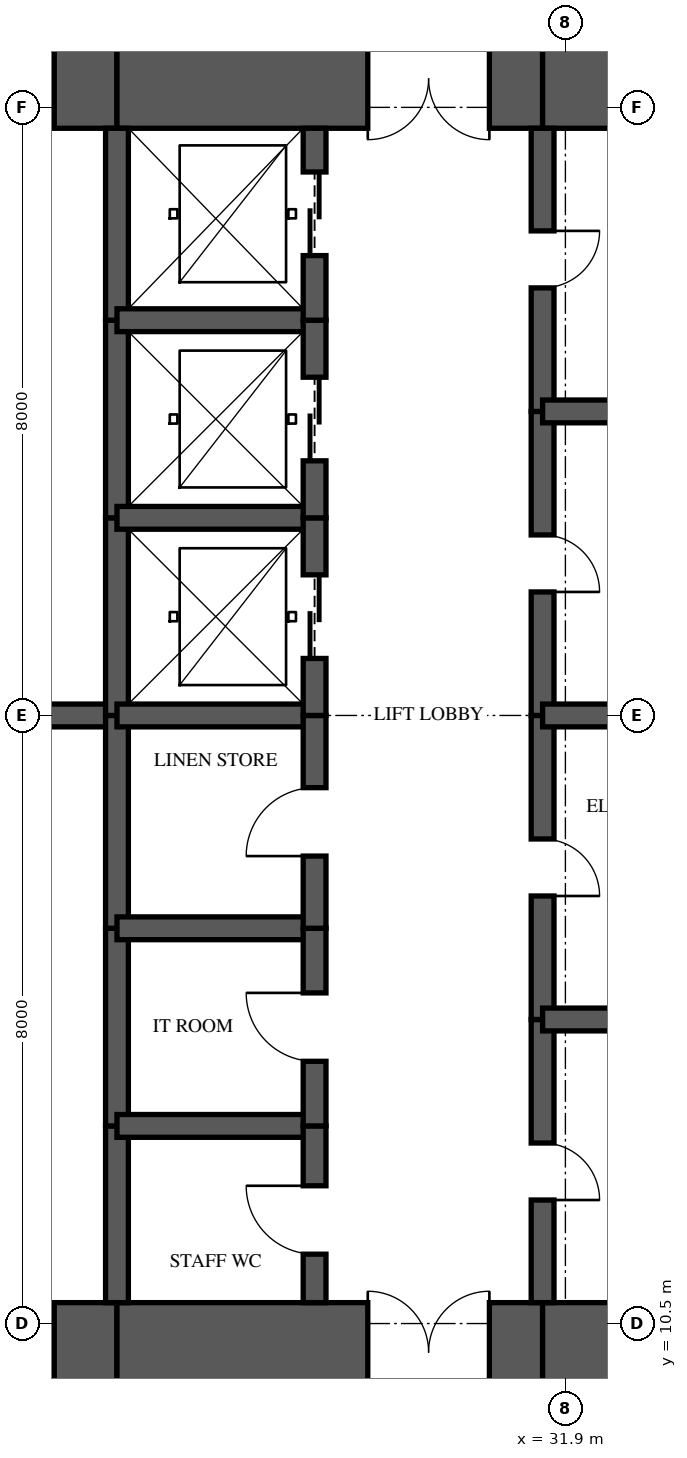
"""IFC4 building model, lengths in metres.
Left out: names, types, materials, properties, quantities, classifications, styles, units other than length and angle.
Written with IfcOpenShell. Run it as: python <this file> out.ifc"""

import sys

from ifc_helpers import new_model, si_unit, direction, frame, frame_2d, origin, place, context, subcontext, project, spatial, rectangle, extrude, element, fill, save


model = new_model("IFC4")
c1 = context("Model", 3, precision=1e-05, world=origin(), true_north=direction((0.0, 1.0)))
c2 = subcontext(c1, "Body", "Model", "MODEL_VIEW")
j1 = project(units=[si_unit("LENGTHUNIT", "METRE"), si_unit("PLANEANGLEUNIT", "RADIAN")], contexts=[c1])
p1 = place(None, origin())
s1 = spatial("IfcSite", under=j1, at=p1, CompositionType="ELEMENT")
p2 = place(p1, origin())
s2 = spatial("IfcBuilding", under=s1, at=p2, CompositionType="ELEMENT")
p3 = place(p2, frame((0.0, 0.0, 171.1)))
s3 = spatial("IfcBuildingStorey", under=s2, at=p3, CompositionType="ELEMENT", Elevation=171.1)
p4 = place(p3, frame((19.65, 10.125, 0.0), z_axis=(0.0, 0.0, 1.0), x_axis=(1.0, 0.0, 0.0)))
e1 = element("IfcWall", 1, at=p4, inside=s3, PredefinedType="SHEAR", context=c2, shape_type="SweptSolid", body=[
    extrude(rectangle(XDim=6.35, YDim=1.3, at=frame_2d((3.175, 0.0))), origin(), (0.0, 0.0, 1.0), 3.35),
])
p5 = place(p4, frame((4.775, 0.0, 0.0)))
e2 = element("IfcOpeningElement", 2, at=p5, cuts=e1, PredefinedType="OPENING", context=c2, shape_type="SweptSolid", body=[
    extrude(rectangle(XDim=0.75, YDim=2.1, at=frame_2d((0.375, 1.05))), frame((0.0, 0.66, 0.0), z_axis=(0.0, -1.0, 0.0), x_axis=(1.0, 0.0, 0.0)), (0.0, 0.0, 1.0), 1.32),
])
p6 = place(p3, frame((26.0, 10.125, 0.0), z_axis=(0.0, 0.0, 1.0), x_axis=(1.0, 0.0, 0.0)))
e3 = element("IfcWall", 3, at=p6, inside=s3, PredefinedType="SHEAR", context=c2, shape_type="SweptSolid", body=[
    extrude(rectangle(XDim=5.6, YDim=1.3, at=frame_2d((2.8, 0.0))), origin(), (0.0, 0.0, 1.0), 3.35),
])
p7 = place(p6, frame((3.3, 0.0, 0.0)))
e4 = element("IfcOpeningElement", 4, at=p7, cuts=e3, PredefinedType="OPENING", context=c2, shape_type="SweptSolid", body=[
    extrude(rectangle(XDim=1.6, YDim=2.1, at=frame_2d((0.8, 1.05))), frame((0.0, 0.66, 0.0), z_axis=(0.0, -1.0, 0.0), x_axis=(1.0, 0.0, 0.0)), (0.0, 0.0, 1.0), 1.32),
])
for number, where, z_axis, x_axis in (
    (5, (31.6, 10.125, 0.0), (0.0, 0.0, 1.0), (1.0, 0.0, 0.0)),
    (6, (35.9, 26.875, 0.0), (0.0, 0.0, 1.0), (-1.0, 0.0, 0.0)),
):
    element("IfcWall", number, at=place(p3, frame(where, z_axis=z_axis, x_axis=x_axis)), inside=s3, PredefinedType="SHEAR", context=c2, shape_type="SweptSolid", body=[
        extrude(rectangle(XDim=4.3, YDim=1.3, at=frame_2d((2.15, 0.0))), origin(), (0.0, 0.0, 1.0), 3.35),
    ])
p8 = place(p3, frame((31.6, 26.875, 0.0), z_axis=(0.0, 0.0, 1.0), x_axis=(-1.0, 0.0, 0.0)))
e7 = element("IfcWall", 7, at=p8, inside=s3, PredefinedType="SHEAR", context=c2, shape_type="SweptSolid", body=[
    extrude(rectangle(XDim=5.6, YDim=1.3, at=frame_2d((2.8, 0.0))), origin(), (0.0, 0.0, 1.0), 3.35),
])
p9 = place(p8, frame((0.7, 0.0, 0.0)))
e8 = element("IfcOpeningElement", 8, at=p9, cuts=e7, PredefinedType="OPENING", context=c2, shape_type="SweptSolid", body=[
    extrude(rectangle(XDim=1.6, YDim=2.1, at=frame_2d((0.8, 1.05))), frame((0.0, 0.66, 0.0), z_axis=(0.0, -1.0, 0.0), x_axis=(1.0, 0.0, 0.0)), (0.0, 0.0, 1.0), 1.32),
])
p10 = place(p3, frame((26.0, 26.875, 0.0), z_axis=(0.0, 0.0, 1.0), x_axis=(-1.0, 0.0, 0.0)))
e9 = element("IfcWall", 9, at=p10, inside=s3, PredefinedType="SHEAR", context=c2, shape_type="SweptSolid", body=[
    extrude(rectangle(XDim=6.35, YDim=1.3, at=frame_2d((3.175, 0.0))), origin(), (0.0, 0.0, 1.0), 3.35),
])
p11 = place(p10, frame((0.825, 0.0, 0.0)))
e10 = element("IfcOpeningElement", 10, at=p11, cuts=e9, PredefinedType="OPENING", context=c2, shape_type="SweptSolid", body=[
    extrude(rectangle(XDim=0.75, YDim=2.1, at=frame_2d((0.375, 1.05))), frame((0.0, 0.66, 0.0), z_axis=(0.0, -1.0, 0.0), x_axis=(1.0, 0.0, 0.0)), (0.0, 0.0, 1.0), 1.32),
])
p12 = place(p3, frame((26.0, 10.775, 0.0), z_axis=(0.0, 0.0, 1.0), x_axis=(0.0, 1.0, 0.0)))
e11 = element("IfcWall", 11, at=p12, inside=s3, PredefinedType="SHEAR", context=c2, shape_type="SweptSolid", body=[
    extrude(rectangle(XDim=2.325, YDim=0.3, at=frame_2d((1.163, 0.0))), origin(), (0.0, 0.0, 1.0), 3.35),
])
p13 = place(p3, frame((26.0, 13.1, 0.0), z_axis=(0.0, 0.0, 1.0), x_axis=(0.0, 1.0, 0.0)))
e12 = element("IfcWall", 12, at=p13, inside=s3, PredefinedType="SHEAR", context=c2, shape_type="SweptSolid", body=[
    extrude(rectangle(XDim=2.6, YDim=0.3, at=frame_2d((1.3, 0.0))), origin(), (0.0, 0.0, 1.0), 3.35),
])
p14 = place(p3, frame((26.0, 15.7, 0.0), z_axis=(0.0, 0.0, 1.0), x_axis=(0.0, 1.0, 0.0)))
e13 = element("IfcWall", 13, at=p14, inside=s3, PredefinedType="SHEAR", context=c2, shape_type="SweptSolid", body=[
    extrude(rectangle(XDim=2.8, YDim=0.3, at=frame_2d((1.4, 0.0))), origin(), (0.0, 0.0, 1.0), 3.35),
])
p15 = place(p3, frame((26.0, 18.5, 0.0), z_axis=(0.0, 0.0, 1.0), x_axis=(0.0, 1.0, 0.0)))
e14 = element("IfcWall", 14, at=p15, inside=s3, PredefinedType="SHEAR", context=c2, shape_type="SweptSolid", body=[
    extrude(rectangle(XDim=2.6, YDim=0.3, at=frame_2d((1.3, 0.0))), origin(), (0.0, 0.0, 1.0), 3.35),
])
p16 = place(p3, frame((26.0, 21.1, 0.0), z_axis=(0.0, 0.0, 1.0), x_axis=(0.0, 1.0, 0.0)))
e15 = element("IfcWall", 15, at=p16, inside=s3, PredefinedType="SHEAR", context=c2, shape_type="SweptSolid", body=[
    extrude(rectangle(XDim=2.6, YDim=0.3, at=frame_2d((1.3, 0.0))), origin(), (0.0, 0.0, 1.0), 3.35),
])
p17 = place(p3, frame((26.0, 23.7, 0.0), z_axis=(0.0, 0.0, 1.0), x_axis=(0.0, 1.0, 0.0)))
e16 = element("IfcWall", 16, at=p17, inside=s3, PredefinedType="SHEAR", context=c2, shape_type="SweptSolid", body=[
    extrude(rectangle(XDim=2.525, YDim=0.3, at=frame_2d((1.263, 0.0))), origin(), (0.0, 0.0, 1.0), 3.35),
])
p18 = place(p3, frame((28.6, 10.775, 0.0), z_axis=(0.0, 0.0, 1.0), x_axis=(0.0, 1.0, 0.0)))
e17 = element("IfcWall", 17, at=p18, inside=s3, PredefinedType="SHEAR", context=c2, shape_type="SweptSolid", body=[
    extrude(rectangle(XDim=2.325, YDim=0.3, at=frame_2d((1.163, 0.0))), origin(), (0.0, 0.0, 1.0), 3.35),
])
p19 = place(p18, frame((0.637, 0.0, 0.0)))
e18 = element("IfcOpeningElement", 18, at=p19, cuts=e17, PredefinedType="OPENING", context=c2, shape_type="SweptSolid", body=[
    extrude(rectangle(XDim=0.9, YDim=2.1, at=frame_2d((0.45, 1.05))), frame((0.0, 0.16, 0.0), z_axis=(0.0, -1.0, 0.0), x_axis=(1.0, 0.0, 0.0)), (0.0, 0.0, 1.0), 0.32),
])
p20 = place(p3, frame((28.6, 13.1, 0.0), z_axis=(0.0, 0.0, 1.0), x_axis=(0.0, 1.0, 0.0)))
e19 = element("IfcWall", 19, at=p20, inside=s3, PredefinedType="SHEAR", context=c2, shape_type="SweptSolid", body=[
    extrude(rectangle(XDim=2.6, YDim=0.3, at=frame_2d((1.3, 0.0))), origin(), (0.0, 0.0, 1.0), 3.35),
])
p21 = place(p20, frame((0.85, 0.0, 0.0)))
e20 = element("IfcOpeningElement", 20, at=p21, cuts=e19, PredefinedType="OPENING", context=c2, shape_type="SweptSolid", body=[
    extrude(rectangle(XDim=0.9, YDim=2.1, at=frame_2d((0.45, 1.05))), frame((0.0, 0.16, 0.0), z_axis=(0.0, -1.0, 0.0), x_axis=(1.0, 0.0, 0.0)), (0.0, 0.0, 1.0), 0.32),
])
p22 = place(p3, frame((28.6, 15.7, 0.0), z_axis=(0.0, 0.0, 1.0), x_axis=(0.0, 1.0, 0.0)))
e21 = element("IfcWall", 21, at=p22, inside=s3, PredefinedType="SHEAR", context=c2, shape_type="SweptSolid", body=[
    extrude(rectangle(XDim=2.8, YDim=0.3, at=frame_2d((1.4, 0.0))), origin(), (0.0, 0.0, 1.0), 3.35),
])
p23 = place(p22, frame((0.95, 0.0, 0.0)))
e22 = element("IfcOpeningElement", 22, at=p23, cuts=e21, PredefinedType="OPENING", context=c2, shape_type="SweptSolid", body=[
    extrude(rectangle(XDim=0.9, YDim=2.1, at=frame_2d((0.45, 1.05))), frame((0.0, 0.16, 0.0), z_axis=(0.0, -1.0, 0.0), x_axis=(1.0, 0.0, 0.0)), (0.0, 0.0, 1.0), 0.32),
])
p24 = place(p3, frame((28.6, 18.5, 0.0), z_axis=(0.0, 0.0, 1.0), x_axis=(0.0, 1.0, 0.0)))
e23 = element("IfcWall", 23, at=p24, inside=s3, PredefinedType="SHEAR", context=c2, shape_type="SweptSolid", body=[
    extrude(rectangle(XDim=2.6, YDim=0.3, at=frame_2d((1.3, 0.0))), origin(), (0.0, 0.0, 1.0), 3.35),
])
p25 = place(p24, frame((0.75, 0.0, 0.0)))
e24 = element("IfcOpeningElement", 24, at=p25, cuts=e23, PredefinedType="OPENING", context=c2, shape_type="SweptSolid", body=[
    extrude(rectangle(XDim=1.1, YDim=2.1, at=frame_2d((0.55, 1.05))), frame((0.0, 0.16, 0.0), z_axis=(0.0, -1.0, 0.0), x_axis=(1.0, 0.0, 0.0)), (0.0, 0.0, 1.0), 0.32),
])
p26 = place(p3, frame((28.6, 21.1, 0.0), z_axis=(0.0, 0.0, 1.0), x_axis=(0.0, 1.0, 0.0)))
e25 = element("IfcWall", 25, at=p26, inside=s3, PredefinedType="SHEAR", context=c2, shape_type="SweptSolid", body=[
    extrude(rectangle(XDim=2.6, YDim=0.3, at=frame_2d((1.3, 0.0))), origin(), (0.0, 0.0, 1.0), 3.35),
])
p27 = place(p26, frame((0.75, 0.0, 0.0)))
e26 = element("IfcOpeningElement", 26, at=p27, cuts=e25, PredefinedType="OPENING", context=c2, shape_type="SweptSolid", body=[
    extrude(rectangle(XDim=1.1, YDim=2.1, at=frame_2d((0.55, 1.05))), frame((0.0, 0.16, 0.0), z_axis=(0.0, -1.0, 0.0), x_axis=(1.0, 0.0, 0.0)), (0.0, 0.0, 1.0), 0.32),
])
p28 = place(p3, frame((28.6, 23.7, 0.0), z_axis=(0.0, 0.0, 1.0), x_axis=(0.0, 1.0, 0.0)))
e27 = element("IfcWall", 27, at=p28, inside=s3, PredefinedType="SHEAR", context=c2, shape_type="SweptSolid", body=[
    extrude(rectangle(XDim=2.525, YDim=0.3, at=frame_2d((1.263, 0.0))), origin(), (0.0, 0.0, 1.0), 3.35),
])
p29 = place(p28, frame((0.85, 0.0, 0.0)))
e28 = element("IfcOpeningElement", 28, at=p29, cuts=e27, PredefinedType="OPENING", context=c2, shape_type="SweptSolid", body=[
    extrude(rectangle(XDim=1.1, YDim=2.1, at=frame_2d((0.55, 1.05))), frame((0.0, 0.16, 0.0), z_axis=(0.0, -1.0, 0.0), x_axis=(1.0, 0.0, 0.0)), (0.0, 0.0, 1.0), 0.32),
])
p30 = place(p3, frame((31.6, 10.775, 0.0), z_axis=(0.0, 0.0, 1.0), x_axis=(0.0, 1.0, 0.0)))
e29 = element("IfcWall", 29, at=p30, inside=s3, PredefinedType="SHEAR", context=c2, shape_type="SweptSolid", body=[
    extrude(rectangle(XDim=3.725, YDim=0.3, at=frame_2d((1.863, 0.0))), origin(), (0.0, 0.0, 1.0), 3.35),
])
p31 = place(p30, frame((1.35, 0.0, 0.0)))
e30 = element("IfcOpeningElement", 30, at=p31, cuts=e29, PredefinedType="OPENING", context=c2, shape_type="SweptSolid", body=[
    extrude(rectangle(XDim=0.75, YDim=2.1, at=frame_2d((0.375, 1.05))), frame((0.0, 0.16, 0.0), z_axis=(0.0, -1.0, 0.0), x_axis=(1.0, 0.0, 0.0)), (0.0, 0.0, 1.0), 0.32),
])
p32 = place(p3, frame((31.6, 14.5, 0.0), z_axis=(0.0, 0.0, 1.0), x_axis=(0.0, 1.0, 0.0)))
e31 = element("IfcWall", 31, at=p32, inside=s3, PredefinedType="SHEAR", context=c2, shape_type="SweptSolid", body=[
    extrude(rectangle(XDim=4.0, YDim=0.3, at=frame_2d((2.0, 0.0))), origin(), (0.0, 0.0, 1.0), 3.35),
])
p33 = place(p32, frame((1.625, 0.0, 0.0)))
e32 = element("IfcOpeningElement", 32, at=p33, cuts=e31, PredefinedType="OPENING", context=c2, shape_type="SweptSolid", body=[
    extrude(rectangle(XDim=0.75, YDim=2.1, at=frame_2d((0.375, 1.05))), frame((0.0, 0.16, 0.0), z_axis=(0.0, -1.0, 0.0), x_axis=(1.0, 0.0, 0.0)), (0.0, 0.0, 1.0), 0.32),
])
p34 = place(p3, frame((31.6, 18.5, 0.0), z_axis=(0.0, 0.0, 1.0), x_axis=(0.0, 1.0, 0.0)))
e33 = element("IfcWall", 33, at=p34, inside=s3, PredefinedType="SHEAR", context=c2, shape_type="SweptSolid", body=[
    extrude(rectangle(XDim=4.0, YDim=0.3, at=frame_2d((2.0, 0.0))), origin(), (0.0, 0.0, 1.0), 3.35),
])
p35 = place(p34, frame((1.625, 0.0, 0.0)))
e34 = element("IfcOpeningElement", 34, at=p35, cuts=e33, PredefinedType="OPENING", context=c2, shape_type="SweptSolid", body=[
    extrude(rectangle(XDim=0.75, YDim=2.1, at=frame_2d((0.375, 1.05))), frame((0.0, 0.16, 0.0), z_axis=(0.0, -1.0, 0.0), x_axis=(1.0, 0.0, 0.0)), (0.0, 0.0, 1.0), 0.32),
])
p36 = place(p3, frame((31.6, 22.5, 0.0), z_axis=(0.0, 0.0, 1.0), x_axis=(0.0, 1.0, 0.0)))
e35 = element("IfcWall", 35, at=p36, inside=s3, PredefinedType="SHEAR", context=c2, shape_type="SweptSolid", body=[
    extrude(rectangle(XDim=3.725, YDim=0.3, at=frame_2d((1.863, 0.0))), origin(), (0.0, 0.0, 1.0), 3.35),
])
p37 = place(p36, frame((1.625, 0.0, 0.0)))
e36 = element("IfcOpeningElement", 36, at=p37, cuts=e35, PredefinedType="OPENING", context=c2, shape_type="SweptSolid", body=[
    extrude(rectangle(XDim=0.75, YDim=2.1, at=frame_2d((0.375, 1.05))), frame((0.0, 0.16, 0.0), z_axis=(0.0, -1.0, 0.0), x_axis=(1.0, 0.0, 0.0)), (0.0, 0.0, 1.0), 0.32),
])
p38 = place(p3, frame((23.6, 18.5, 0.0), z_axis=(0.0, 0.0, 1.0), x_axis=(1.0, 0.0, 0.0)))
e37 = element("IfcWall", 37, at=p38, inside=s3, PredefinedType="SHEAR", context=c2, shape_type="SweptSolid", body=[
    extrude(rectangle(XDim=2.4, YDim=0.3, at=frame_2d((1.2, 0.0))), origin(), (0.0, 0.0, 1.0), 3.35),
])
for number, where, z_axis, x_axis in (
    (38, (26.0, 13.1, 0.0), (0.0, 0.0, 1.0), (1.0, 0.0, 0.0)),
    (39, (26.0, 15.7, 0.0), (0.0, 0.0, 1.0), (1.0, 0.0, 0.0)),
    (40, (26.0, 18.5, 0.0), (0.0, 0.0, 1.0), (1.0, 0.0, 0.0)),
    (41, (26.0, 21.1, 0.0), (0.0, 0.0, 1.0), (1.0, 0.0, 0.0)),
    (42, (26.0, 23.7, 0.0), (0.0, 0.0, 1.0), (1.0, 0.0, 0.0)),
):
    element("IfcWall", number, at=place(p3, frame(where, z_axis=z_axis, x_axis=x_axis)), inside=s3, PredefinedType="SHEAR", context=c2, shape_type="SweptSolid", body=[
        extrude(rectangle(XDim=2.6, YDim=0.3, at=frame_2d((1.3, 0.0))), origin(), (0.0, 0.0, 1.0), 3.35),
    ])
for number, where, z_axis, x_axis in (
    (43, (31.6, 14.5, 0.0), (0.0, 0.0, 1.0), (1.0, 0.0, 0.0)),
    (44, (31.6, 18.5, 0.0), (0.0, 0.0, 1.0), (1.0, 0.0, 0.0)),
    (45, (31.6, 22.5, 0.0), (0.0, 0.0, 1.0), (1.0, 0.0, 0.0)),
):
    element("IfcWall", number, at=place(p3, frame(where, z_axis=z_axis, x_axis=x_axis)), inside=s3, PredefinedType="SHEAR", context=c2, shape_type="SweptSolid", body=[
        extrude(rectangle(XDim=4.3, YDim=0.3, at=frame_2d((2.15, 0.0))), origin(), (0.0, 0.0, 1.0), 3.35),
    ])
p39 = place(p25, origin())
e46 = element("IfcDoor", 46, at=p39, inside=s3, OperationType="SLIDING_TO_LEFT", PredefinedType="DOOR", context=c2, shape_type="SweptSolid", body=[
    extrude(rectangle(XDim=1.1, YDim=2.1, at=frame_2d((0.55, 1.05))), frame((0.0, 0.025, 0.0), z_axis=(0.0, -1.0, 0.0), x_axis=(1.0, 0.0, 0.0)), (0.0, 0.0, 1.0), 0.05),
])
fill(e24, e46)
p40 = place(p27, origin())
e47 = element("IfcDoor", 47, at=p40, inside=s3, OperationType="SLIDING_TO_LEFT", PredefinedType="DOOR", context=c2, shape_type="SweptSolid", body=[
    extrude(rectangle(XDim=1.1, YDim=2.1, at=frame_2d((0.55, 1.05))), frame((0.0, 0.025, 0.0), z_axis=(0.0, -1.0, 0.0), x_axis=(1.0, 0.0, 0.0)), (0.0, 0.0, 1.0), 0.05),
])
fill(e26, e47)
p41 = place(p29, origin())
e48 = element("IfcDoor", 48, at=p41, inside=s3, OperationType="SLIDING_TO_LEFT", PredefinedType="DOOR", context=c2, shape_type="SweptSolid", body=[
    extrude(rectangle(XDim=1.1, YDim=2.1, at=frame_2d((0.55, 1.05))), frame((0.0, 0.025, 0.0), z_axis=(0.0, -1.0, 0.0), x_axis=(1.0, 0.0, 0.0)), (0.0, 0.0, 1.0), 0.05),
])
fill(e28, e48)
p42 = place(p19, origin())
e49 = element("IfcDoor", 49, at=p42, inside=s3, OperationType="SINGLE_SWING_RIGHT", PredefinedType="DOOR", context=c2, shape_type="SweptSolid", body=[
    extrude(rectangle(XDim=0.9, YDim=2.1, at=frame_2d((0.45, 1.05))), frame((0.0, 0.025, 0.0), z_axis=(0.0, -1.0, 0.0), x_axis=(1.0, 0.0, 0.0)), (0.0, 0.0, 1.0), 0.05),
])
fill(e18, e49)
p43 = place(p21, origin())
e50 = element("IfcDoor", 50, at=p43, inside=s3, OperationType="SINGLE_SWING_RIGHT", PredefinedType="DOOR", context=c2, shape_type="SweptSolid", body=[
    extrude(rectangle(XDim=0.9, YDim=2.1, at=frame_2d((0.45, 1.05))), frame((0.0, 0.025, 0.0), z_axis=(0.0, -1.0, 0.0), x_axis=(1.0, 0.0, 0.0)), (0.0, 0.0, 1.0), 0.05),
])
fill(e20, e50)
p44 = place(p23, origin())
e51 = element("IfcDoor", 51, at=p44, inside=s3, OperationType="SINGLE_SWING_LEFT", PredefinedType="DOOR", context=c2, shape_type="SweptSolid", body=[
    extrude(rectangle(XDim=0.9, YDim=2.1, at=frame_2d((0.45, 1.05))), frame((0.0, 0.025, 0.0), z_axis=(0.0, -1.0, 0.0), x_axis=(1.0, 0.0, 0.0)), (0.0, 0.0, 1.0), 0.05),
])
fill(e22, e51)
p45 = place(p7, origin())
e52 = element("IfcDoor", 52, at=p45, inside=s3, OperationType="DOUBLE_DOOR_SINGLE_SWING", PredefinedType="DOOR", context=c2, shape_type="SweptSolid", body=[
    extrude(rectangle(XDim=1.6, YDim=2.1, at=frame_2d((0.8, 1.05))), frame((0.0, 0.025, 0.0), z_axis=(0.0, -1.0, 0.0), x_axis=(1.0, 0.0, 0.0)), (0.0, 0.0, 1.0), 0.05),
])
fill(e4, e52)
p46 = place(p9, origin())
e53 = element("IfcDoor", 53, at=p46, inside=s3, OperationType="DOUBLE_DOOR_SINGLE_SWING", PredefinedType="DOOR", context=c2, shape_type="SweptSolid", body=[
    extrude(rectangle(XDim=1.6, YDim=2.1, at=frame_2d((0.8, 1.05))), frame((0.0, 0.025, 0.0), z_axis=(0.0, -1.0, 0.0), x_axis=(1.0, 0.0, 0.0)), (0.0, 0.0, 1.0), 0.05),
])
fill(e8, e53)
p47 = place(p31, frame((0.75, 0.0, 0.0), z_axis=(0.0, 0.0, 1.0), x_axis=(-1.0, 0.0, 0.0)))
e54 = element("IfcDoor", 54, at=p47, inside=s3, OperationType="SINGLE_SWING_RIGHT", PredefinedType="DOOR", context=c2, shape_type="SweptSolid", body=[
    extrude(rectangle(XDim=0.75, YDim=2.1, at=frame_2d((0.375, 1.05))), frame((0.0, 0.025, 0.0), z_axis=(0.0, -1.0, 0.0), x_axis=(1.0, 0.0, 0.0)), (0.0, 0.0, 1.0), 0.05),
])
fill(e30, e54)
p48 = place(p33, frame((0.75, 0.0, 0.0), z_axis=(0.0, 0.0, 1.0), x_axis=(-1.0, 0.0, 0.0)))
e55 = element("IfcDoor", 55, at=p48, inside=s3, OperationType="SINGLE_SWING_RIGHT", PredefinedType="DOOR", context=c2, shape_type="SweptSolid", body=[
    extrude(rectangle(XDim=0.75, YDim=2.1, at=frame_2d((0.375, 1.05))), frame((0.0, 0.025, 0.0), z_axis=(0.0, -1.0, 0.0), x_axis=(1.0, 0.0, 0.0)), (0.0, 0.0, 1.0), 0.05),
])
fill(e32, e55)
p49 = place(p35, frame((0.75, 0.0, 0.0), z_axis=(0.0, 0.0, 1.0), x_axis=(-1.0, 0.0, 0.0)))
e56 = element("IfcDoor", 56, at=p49, inside=s3, OperationType="SINGLE_SWING_RIGHT", PredefinedType="DOOR", context=c2, shape_type="SweptSolid", body=[
    extrude(rectangle(XDim=0.75, YDim=2.1, at=frame_2d((0.375, 1.05))), frame((0.0, 0.025, 0.0), z_axis=(0.0, -1.0, 0.0), x_axis=(1.0, 0.0, 0.0)), (0.0, 0.0, 1.0), 0.05),
])
fill(e34, e56)
p50 = place(p37, frame((0.75, 0.0, 0.0), z_axis=(0.0, 0.0, 1.0), x_axis=(-1.0, 0.0, 0.0)))
e57 = element("IfcDoor", 57, at=p50, inside=s3, OperationType="SINGLE_SWING_LEFT", PredefinedType="DOOR", context=c2, shape_type="SweptSolid", body=[
    extrude(rectangle(XDim=0.75, YDim=2.1, at=frame_2d((0.375, 1.05))), frame((0.0, 0.025, 0.0), z_axis=(0.0, -1.0, 0.0), x_axis=(1.0, 0.0, 0.0)), (0.0, 0.0, 1.0), 0.05),
])
fill(e36, e57)
p51 = place(p5, origin())
e58 = element("IfcDoor", 58, at=p51, inside=s3, OperationType="SINGLE_SWING_LEFT", PredefinedType="DOOR", context=c2, shape_type="SweptSolid", body=[
    extrude(rectangle(XDim=0.75, YDim=2.1, at=frame_2d((0.375, 1.05))), frame((0.0, 0.025, 0.0), z_axis=(0.0, -1.0, 0.0), x_axis=(1.0, 0.0, 0.0)), (0.0, 0.0, 1.0), 0.05),
])
fill(e2, e58)
p52 = place(p11, origin())
e59 = element("IfcDoor", 59, at=p52, inside=s3, OperationType="SINGLE_SWING_RIGHT", PredefinedType="DOOR", context=c2, shape_type="SweptSolid", body=[
    extrude(rectangle(XDim=0.75, YDim=2.1, at=frame_2d((0.375, 1.05))), frame((0.0, 0.025, 0.0), z_axis=(0.0, -1.0, 0.0), x_axis=(1.0, 0.0, 0.0)), (0.0, 0.0, 1.0), 0.05),
])
fill(e10, e59)
save(model, sys.argv[1])
